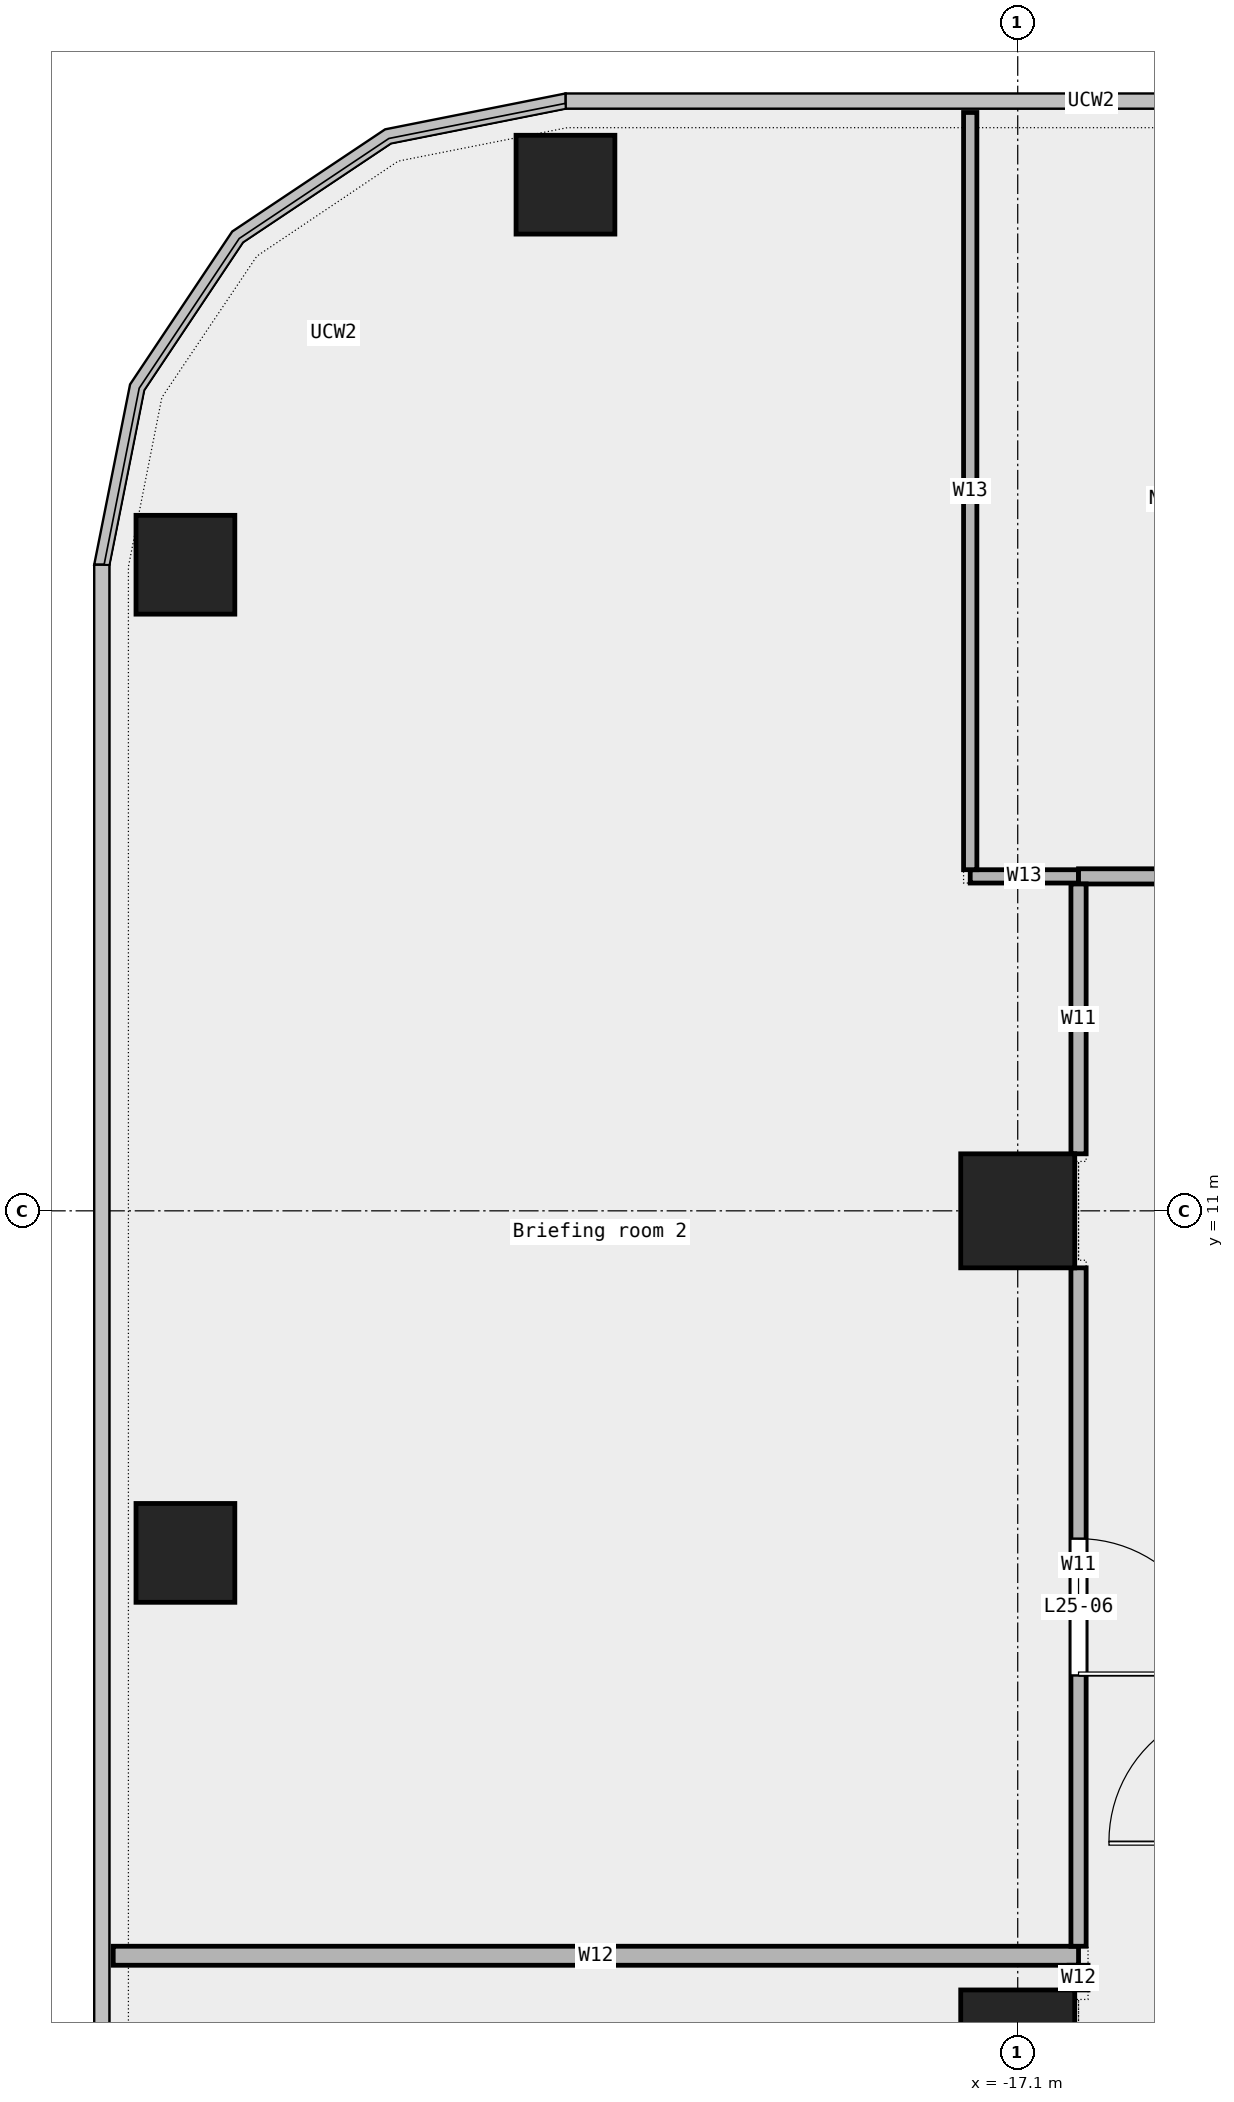
"""IFC4 building model, lengths in metres.
Left out: names, types, materials, properties, quantities, classifications, styles, units other than length and angle.
Written with IfcOpenShell. Run it as: python <this file> out.ifc"""

import sys

from ifc_helpers import new_model, si_unit, direction, frame, frame_2d, origin, origin_2d, place, context, subcontext, project, spatial, rectangle, extrude, element, fill, save


model = new_model("IFC4")
c1 = context("Model", 3, precision=1e-05, world=origin(), true_north=direction((0.0, 1.0)))
c2 = subcontext(c1, "Body", "Model", "MODEL_VIEW")
j1 = project(units=[si_unit("LENGTHUNIT", "METRE"), si_unit("PLANEANGLEUNIT", "RADIAN")], contexts=[c1])
p1 = place(None, origin())
s1 = spatial("IfcSite", under=j1, at=p1, CompositionType="ELEMENT")
p2 = place(p1, origin())
s2 = spatial("IfcBuilding", under=s1, at=p2, CompositionType="ELEMENT")
p3 = place(p2, frame((0.0, 0.0, 126.1)))
s3 = spatial("IfcBuildingStorey", under=s2, at=p3, CompositionType="ELEMENT", Elevation=126.1)
for number, where, z_axis, x_axis in (
    (1, (-23.05, 24.5, 0.0), (0.0, 0.0, 1.0), (1.0, 0.0, 0.0)),
    (2, (-28.05, 19.5, 0.0), (0.0, 0.0, 1.0), (1.0, 0.0, 0.0)),
    (3, (-28.05, 6.5, 0.0), (0.0, 0.0, 1.0), (1.0, 0.0, 0.0)),
):
    element("IfcColumn", number, at=place(p3, frame(where, z_axis=z_axis, x_axis=x_axis)), inside=s3, PredefinedType="COLUMN", context=c2, shape_type="SweptSolid", body=[
        extrude(rectangle(XDim=1.3, YDim=1.3, at=origin_2d()), origin(), (0.0, 0.0, 1.0), 4.05),
    ])
for number, where, z_axis, x_axis in (
    (4, (-17.1, 0.0, 0.0), (0.0, 0.0, 1.0), (1.0, 0.0, 0.0)),
    (5, (-17.1, 11.0, 0.0), (0.0, 0.0, 1.0), (1.0, 0.0, 0.0)),
):
    element("IfcColumn", number, at=place(p3, frame(where, z_axis=z_axis, x_axis=x_axis)), inside=s3, PredefinedType="COLUMN", context=c2, shape_type="SweptSolid", body=[
        extrude(rectangle(XDim=1.5, YDim=1.5, at=origin_2d()), origin(), (0.0, 0.0, 1.0), 4.05),
    ])
p4 = place(p3, frame((-29.0, 1.2, 0.0), z_axis=(0.0, 0.0, 1.0), x_axis=(1.0, 0.0, 0.0)))
e6 = element("IfcWall", 6, at=p4, inside=s3, PredefinedType="PARTITIONING", context=c2, shape_type="SweptSolid", body=[
    extrude(rectangle(XDim=12.7, YDim=0.25, at=frame_2d((6.35, 0.0))), origin(), (0.0, 0.0, 1.0), 4.05),
])
p5 = place(p3, frame((-17.725, 15.4, 0.0), z_axis=(0.0, 0.0, 1.0), x_axis=(1.0, 0.0, 0.0)))
e7 = element("IfcWall", 7, at=p5, inside=s3, PredefinedType="PARTITIONING", context=c2, shape_type="SweptSolid", body=[
    extrude(rectangle(XDim=1.425, YDim=0.175, at=frame_2d((0.712, 0.0))), origin(), (0.0, 0.0, 1.0), 4.05),
])
p6 = place(p3, frame((-16.3, 15.4, 0.0), z_axis=(0.0, 0.0, 1.0), x_axis=(1.0, 0.0, 0.0)))
e8 = element("IfcWall", 8, at=p6, inside=s3, PredefinedType="PARTITIONING", context=c2, shape_type="SweptSolid", body=[
    extrude(rectangle(XDim=20.91, YDim=0.2, at=frame_2d((10.455, 0.0))), origin(), (0.0, 0.0, 1.0), 4.05),
])
p7 = place(p6, frame((13.245, 0.0, 0.0)))
e9 = element("IfcOpeningElement", 9, at=p7, cuts=e8, PredefinedType="OPENING", context=c2, shape_type="SweptSolid", body=[
    extrude(rectangle(XDim=1.5, YDim=2.1, at=frame_2d((0.75, 1.05))), frame((0.0, 0.112, 0.0), z_axis=(0.0, -1.0, 0.0), x_axis=(1.0, 0.0, 0.0)), (0.0, 0.0, 1.0), 0.224),
])
p8 = place(p6, frame((2.387, 0.0, 0.0)))
e10 = element("IfcOpeningElement", 10, at=p8, cuts=e8, PredefinedType="OPENING", context=c2, shape_type="SweptSolid", body=[
    extrude(rectangle(XDim=1.2, YDim=2.1, at=frame_2d((0.6, 1.05))), frame((0.0, 0.112, 0.0), z_axis=(0.0, -1.0, 0.0), x_axis=(1.0, 0.0, 0.0)), (0.0, 0.0, 1.0), 0.224),
])
p9 = place(p3, frame((-17.725, 15.488, 0.0), z_axis=(0.0, 0.0, 1.0), x_axis=(0.0, 1.0, 0.0)))
e11 = element("IfcWall", 11, at=p9, inside=s3, PredefinedType="PARTITIONING", context=c2, shape_type="SweptSolid", body=[
    extrude(rectangle(XDim=9.962, YDim=0.175, at=frame_2d((4.981, 0.0))), origin(), (0.0, 0.0, 1.0), 4.05),
])
p10 = place(p3, frame((-16.3, 1.325, 0.0), z_axis=(0.0, 0.0, 1.0), x_axis=(0.0, 1.0, 0.0)))
e12 = element("IfcWall", 12, at=p10, inside=s3, PredefinedType="PARTITIONING", context=c2, shape_type="SweptSolid", body=[
    extrude(rectangle(XDim=8.925, YDim=0.2, at=frame_2d((4.462, 0.0))), origin(), (0.0, 0.0, 1.0), 4.05),
])
p11 = place(p10, frame((3.562, 0.0, 0.0)))
e13 = element("IfcOpeningElement", 13, at=p11, cuts=e12, PredefinedType="OPENING", context=c2, shape_type="SweptSolid", body=[
    extrude(rectangle(XDim=1.8, YDim=2.1, at=frame_2d((0.9, 1.05))), frame((0.0, 0.112, 0.0), z_axis=(0.0, -1.0, 0.0), x_axis=(1.0, 0.0, 0.0)), (0.0, 0.0, 1.0), 0.224),
])
p12 = place(p3, frame((-16.3, 11.75, 0.0), z_axis=(0.0, 0.0, 1.0), x_axis=(0.0, 1.0, 0.0)))
e14 = element("IfcWall", 14, at=p12, inside=s3, PredefinedType="PARTITIONING", context=c2, shape_type="SweptSolid", body=[
    extrude(rectangle(XDim=3.55, YDim=0.2, at=frame_2d((1.775, 0.0))), origin(), (0.0, 0.0, 1.0), 4.05),
])
p13 = place(p3, frame((-16.3, 0.75, 0.0), z_axis=(0.0, 0.0, 1.0), x_axis=(0.0, 1.0, 0.0)))
e15 = element("IfcWall", 15, at=p13, inside=s3, PredefinedType="PARTITIONING", context=c2, shape_type="SweptSolid", body=[
    extrude(rectangle(XDim=0.325, YDim=0.25, at=frame_2d((0.163, 0.0))), origin(), (0.0, 0.0, 1.0), 4.05),
])
p14 = place(p11, origin())
e16 = element("IfcDoor", 16, at=p14, inside=s3, OperationType="DOUBLE_DOOR_SINGLE_SWING", PredefinedType="DOOR", context=c2, shape_type="SweptSolid", body=[
    extrude(rectangle(XDim=1.8, YDim=2.1, at=frame_2d((0.9, 1.05))), frame((0.0, 0.025, 0.0), z_axis=(0.0, -1.0, 0.0), x_axis=(1.0, 0.0, 0.0)), (0.0, 0.0, 1.0), 0.05),
])
fill(e13, e16)
save(model, sys.argv[1])
